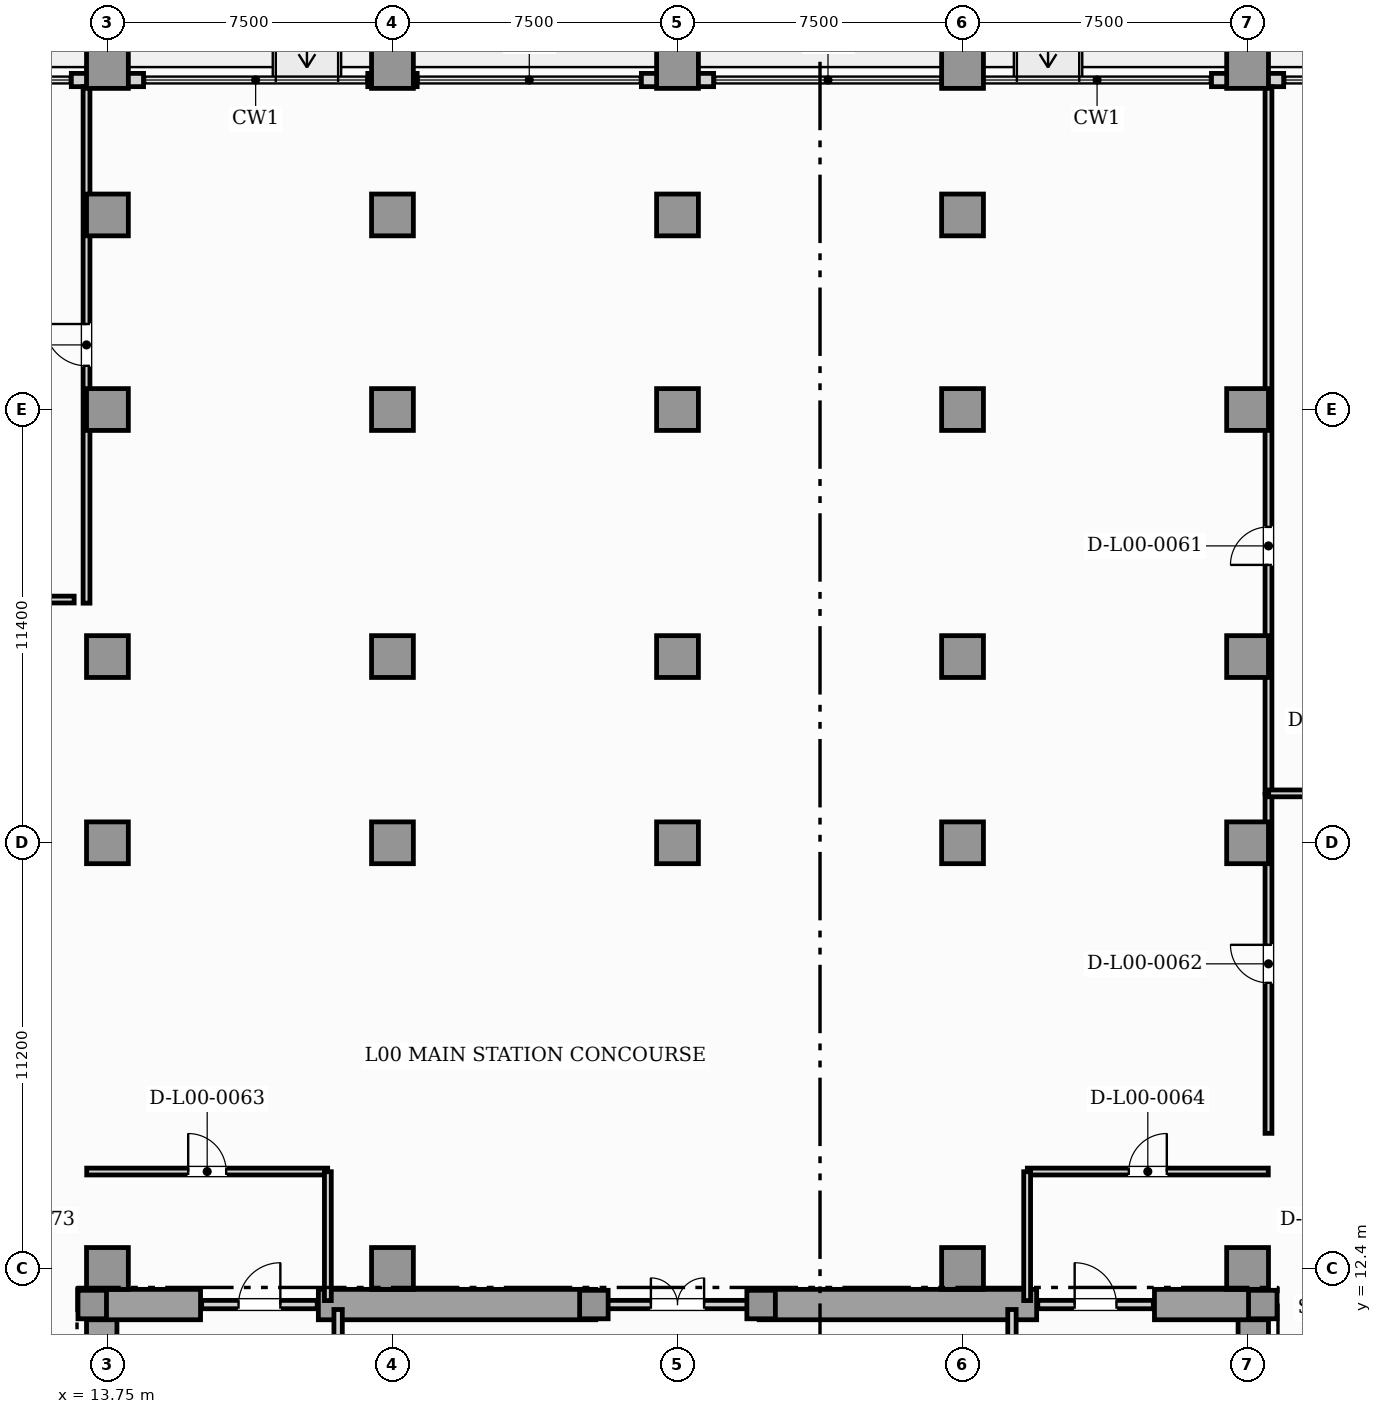
"""IFC4 building model, lengths in metres.
Left out: names, types, materials, properties, quantities, classifications, styles, units other than length and angle.
Written with IfcOpenShell. Run it as: python <this file> out.ifc"""

import sys

from ifc_helpers import new_model, si_unit, direction, frame, frame_2d, origin, origin_2d, place, context, subcontext, project, spatial, rectangle, extrude, element, fill, save


model = new_model("IFC4")
c1 = context("Model", 3, precision=1e-05, world=origin(), true_north=direction((0.0, 1.0)))
c2 = subcontext(c1, "Body", "Model", "MODEL_VIEW")
j1 = project(units=[si_unit("LENGTHUNIT", "METRE"), si_unit("PLANEANGLEUNIT", "RADIAN")], contexts=[c1])
p1 = place(None, origin())
s1 = spatial("IfcSite", under=j1, at=p1, CompositionType="ELEMENT")
p2 = place(p1, origin())
s2 = spatial("IfcBuilding", under=s1, at=p2, CompositionType="ELEMENT")
p3 = place(p2, origin())
s3 = spatial("IfcBuildingStorey", under=s2, at=p3, CompositionType="ELEMENT", Elevation=0.0)
for number, where, z_axis, x_axis in (
    (1, (13.6, 0.92, 0.0), (0.0, 0.0, 1.0), (0.0, 1.0, 0.0)),
    (2, (43.9, 0.92, 0.0), (0.0, 0.0, 1.0), (0.0, 1.0, 0.0)),
):
    element("IfcWall", number, at=place(p3, frame(where, z_axis=z_axis, x_axis=x_axis)), inside=s3, PredefinedType="SHEAR", context=c2, shape_type="SweptSolid", body=[
        extrude(rectangle(XDim=10.53, YDim=0.8, at=frame_2d((5.265, 0.0))), origin(), (0.0, 0.0, 1.0), 5.1),
    ])
p4 = place(p3, frame((13.25, 11.45, 0.0), z_axis=(0.0, 0.0, 1.0), x_axis=(1.0, 0.0, 0.0)))
e3 = element("IfcWall", 3, at=p4, inside=s3, PredefinedType="SHEAR", context=c2, shape_type="SweptSolid", body=[
    extrude(rectangle(XDim=2.95, YDim=0.8, at=frame_2d((1.475, 0.0))), origin(), (0.0, 0.0, 1.0), 5.1),
])
for number, where, z_axis, x_axis in (
    (4, (19.3, 11.45, 0.0), (0.0, 0.0, 1.0), (1.0, 0.0, 0.0)),
    (5, (30.9, 11.45, 0.0), (0.0, 0.0, 1.0), (1.0, 0.0, 0.0)),
):
    element("IfcWall", number, at=place(p3, frame(where, z_axis=z_axis, x_axis=x_axis)), inside=s3, PredefinedType="SHEAR", context=c2, shape_type="SweptSolid", body=[
        extrude(rectangle(XDim=7.3, YDim=0.8, at=frame_2d((3.65, 0.0))), origin(), (0.0, 0.0, 1.0), 5.1),
    ])
p5 = place(p3, frame((41.3, 11.45, 0.0), z_axis=(0.0, 0.0, 1.0), x_axis=(1.0, 0.0, 0.0)))
e6 = element("IfcWall", 6, at=p5, inside=s3, PredefinedType="SHEAR", context=c2, shape_type="SweptSolid", body=[
    extrude(rectangle(XDim=2.95, YDim=0.8, at=frame_2d((1.475, 0.0))), origin(), (0.0, 0.0, 1.0), 5.1),
])
for number, where, z_axis, x_axis in (
    (7, (13.35, 11.45, 0.0), (0.0, 0.0, 1.0), (1.0, 0.0, 0.0)),
    (8, (44.15, 11.45, 0.0), (0.0, 0.0, 1.0), (1.0, 0.0, 0.0)),
    (9, (26.55, 11.45, 0.0), (0.0, 0.0, 1.0), (1.0, 0.0, 0.0)),
    (10, (30.95, 11.45, 0.0), (0.0, 0.0, 1.0), (1.0, 0.0, 0.0)),
):
    element("IfcColumn", number, at=place(p3, frame(where, z_axis=z_axis, x_axis=x_axis)), inside=s3, PredefinedType="COLUMN", context=c2, shape_type="SweptSolid", body=[
        extrude(rectangle(XDim=0.75, YDim=0.75, at=origin_2d()), origin(), (0.0, 0.0, 1.0), 5.4),
    ])
for number, where, z_axis, x_axis in (
    (11, (13.75, 12.4, 0.0), (0.0, 0.0, 1.0), (1.0, 0.0, 0.0)),
    (12, (13.75, 23.6, 0.0), (0.0, 0.0, 1.0), (1.0, 0.0, 0.0)),
    (13, (13.75, 35.0, 0.0), (0.0, 0.0, 1.0), (1.0, 0.0, 0.0)),
    (14, (13.75, 44.0, 0.0), (0.0, 0.0, 1.0), (1.0, 0.0, 0.0)),
    (15, (28.75, 23.6, 0.0), (0.0, 0.0, 1.0), (1.0, 0.0, 0.0)),
    (16, (28.75, 35.0, 0.0), (0.0, 0.0, 1.0), (1.0, 0.0, 0.0)),
    (17, (28.75, 44.0, 0.0), (0.0, 0.0, 1.0), (1.0, 0.0, 0.0)),
    (18, (43.75, 12.4, 0.0), (0.0, 0.0, 1.0), (1.0, 0.0, 0.0)),
    (19, (43.75, 23.6, 0.0), (0.0, 0.0, 1.0), (1.0, 0.0, 0.0)),
    (20, (43.75, 35.0, 0.0), (0.0, 0.0, 1.0), (1.0, 0.0, 0.0)),
    (21, (43.75, 44.0, 0.0), (0.0, 0.0, 1.0), (1.0, 0.0, 0.0)),
    (22, (21.25, 12.4, 0.0), (0.0, 0.0, 1.0), (1.0, 0.0, 0.0)),
    (23, (36.25, 12.4, 0.0), (0.0, 0.0, 1.0), (1.0, 0.0, 0.0)),
    (24, (21.25, 23.6, 0.0), (0.0, 0.0, 1.0), (1.0, 0.0, 0.0)),
    (25, (36.25, 23.6, 0.0), (0.0, 0.0, 1.0), (1.0, 0.0, 0.0)),
    (26, (13.75, 28.5, 0.0), (0.0, 0.0, 1.0), (1.0, 0.0, 0.0)),
    (27, (21.25, 28.5, 0.0), (0.0, 0.0, 1.0), (1.0, 0.0, 0.0)),
    (28, (28.75, 28.5, 0.0), (0.0, 0.0, 1.0), (1.0, 0.0, 0.0)),
    (29, (36.25, 28.5, 0.0), (0.0, 0.0, 1.0), (1.0, 0.0, 0.0)),
    (30, (43.75, 28.5, 0.0), (0.0, 0.0, 1.0), (1.0, 0.0, 0.0)),
    (31, (21.25, 35.0, 0.0), (0.0, 0.0, 1.0), (1.0, 0.0, 0.0)),
    (32, (36.25, 35.0, 0.0), (0.0, 0.0, 1.0), (1.0, 0.0, 0.0)),
    (33, (13.75, 40.12, 0.0), (0.0, 0.0, 1.0), (1.0, 0.0, 0.0)),
    (34, (21.25, 40.12, 0.0), (0.0, 0.0, 1.0), (1.0, 0.0, 0.0)),
    (35, (28.75, 40.12, 0.0), (0.0, 0.0, 1.0), (1.0, 0.0, 0.0)),
    (36, (36.25, 40.12, 0.0), (0.0, 0.0, 1.0), (1.0, 0.0, 0.0)),
    (37, (21.25, 44.0, 0.0), (0.0, 0.0, 1.0), (1.0, 0.0, 0.0)),
    (38, (36.25, 44.0, 0.0), (0.0, 0.0, 1.0), (1.0, 0.0, 0.0)),
):
    element("IfcColumn", number, at=place(p3, frame(where, z_axis=z_axis, x_axis=x_axis)), inside=s3, PredefinedType="COLUMN", context=c2, shape_type="SweptSolid", body=[
        extrude(rectangle(XDim=1.1, YDim=1.1, at=origin_2d()), origin(), (0.0, 0.0, 1.0), 5.4),
    ])
p6 = place(p3, frame((12.8, 43.67, 0.0), z_axis=(0.0, 0.0, 1.0), x_axis=(1.0, 0.0, 0.0)))
e39 = element("IfcWall", 39, at=p6, inside=s3, PredefinedType="SOLIDWALL", context=c2, shape_type="SweptSolid", body=[
    extrude(rectangle(XDim=1.9, YDim=0.35, at=frame_2d((0.95, 0.0))), origin(), (0.0, 0.0, 1.0), 4.483),
])
p7 = place(p3, frame((20.6, 43.67, 0.0), z_axis=(0.0, 0.0, 1.0), x_axis=(1.0, 0.0, 0.0)))
e40 = element("IfcWall", 40, at=p7, inside=s3, PredefinedType="SOLIDWALL", context=c2, shape_type="SweptSolid", body=[
    extrude(rectangle(XDim=1.3, YDim=0.35, at=frame_2d((0.65, 0.0))), origin(), (0.0, 0.0, 1.0), 5.1),
])
for number, where, z_axis, x_axis in (
    (41, (27.8, 43.67, 0.0), (0.0, 0.0, 1.0), (1.0, 0.0, 0.0)),
    (42, (42.8, 43.67, 0.0), (0.0, 0.0, 1.0), (1.0, 0.0, 0.0)),
):
    element("IfcWall", number, at=place(p3, frame(where, z_axis=z_axis, x_axis=x_axis)), inside=s3, PredefinedType="SOLIDWALL", context=c2, shape_type="SweptSolid", body=[
        extrude(rectangle(XDim=1.9, YDim=0.35, at=frame_2d((0.95, 0.0))), origin(), (0.0, 0.0, 1.0), 4.483),
    ])
p8 = place(p3, frame((19.82, 8.52, 0.0), z_axis=(0.0, 0.0, 1.0), x_axis=(0.0, 1.0, 0.0)))
e43 = element("IfcWall", 43, at=p8, inside=s3, PredefinedType="SOLIDWALL", context=c2, shape_type="SweptSolid", body=[
    extrude(rectangle(XDim=2.8, YDim=0.22, at=frame_2d((1.4, 0.0))), origin(), (0.0, 0.0, 1.0), 4.555),
])
p9 = place(p8, frame((0.85, 0.0, 0.0)))
e44 = element("IfcOpeningElement", 44, at=p9, cuts=e43, PredefinedType="OPENING", context=c2, shape_type="SweptSolid", body=[
    extrude(rectangle(XDim=1.1, YDim=2.2, at=frame_2d((0.55, 1.1))), frame((0.0, 0.12, 0.0), z_axis=(0.0, -1.0, 0.0), x_axis=(1.0, 0.0, 0.0)), (0.0, 0.0, 1.0), 0.24),
])
p10 = place(p3, frame((37.55, 8.52, 0.0), z_axis=(0.0, 0.0, 1.0), x_axis=(0.0, 1.0, 0.0)))
e45 = element("IfcWall", 45, at=p10, inside=s3, PredefinedType="SOLIDWALL", context=c2, shape_type="SweptSolid", body=[
    extrude(rectangle(XDim=2.8, YDim=0.22, at=frame_2d((1.4, 0.0))), origin(), (0.0, 0.0, 1.0), 4.555),
])
p11 = place(p10, frame((0.85, 0.0, 0.0)))
e46 = element("IfcOpeningElement", 46, at=p11, cuts=e45, PredefinedType="OPENING", context=c2, shape_type="SweptSolid", body=[
    extrude(rectangle(XDim=1.1, YDim=2.2, at=frame_2d((0.55, 1.1))), frame((0.0, 0.12, 0.0), z_axis=(0.0, -1.0, 0.0), x_axis=(1.0, 0.0, 0.0)), (0.0, 0.0, 1.0), 0.24),
])
p12 = place(p3, frame((16.23, 11.45, 0.0), z_axis=(0.0, 0.0, 1.0), x_axis=(1.0, 0.0, 0.0)))
e47 = element("IfcWall", 47, at=p12, inside=s3, PredefinedType="SOLIDWALL", context=c2, shape_type="SweptSolid", body=[
    extrude(rectangle(XDim=3.04, YDim=0.22, at=frame_2d((1.52, 0.0))), origin(), (0.0, 0.0, 1.0), 5.1),
])
p13 = place(p12, frame((0.97, 0.0, 0.0)))
e48 = element("IfcOpeningElement", 48, at=p13, cuts=e47, PredefinedType="OPENING", context=c2, shape_type="SweptSolid", body=[
    extrude(rectangle(XDim=1.1, YDim=2.2, at=frame_2d((0.55, 1.1))), frame((0.0, 0.12, 0.0), z_axis=(0.0, -1.0, 0.0), x_axis=(1.0, 0.0, 0.0)), (0.0, 0.0, 1.0), 0.24),
])
p14 = place(p3, frame((26.63, 11.45, 0.0), z_axis=(0.0, 0.0, 1.0), x_axis=(1.0, 0.0, 0.0)))
e49 = element("IfcWall", 49, at=p14, inside=s3, PredefinedType="SOLIDWALL", context=c2, shape_type="SweptSolid", body=[
    extrude(rectangle(XDim=4.24, YDim=0.22, at=frame_2d((2.12, 0.0))), origin(), (0.0, 0.0, 1.0), 5.1),
])
p15 = place(p14, frame((1.42, 0.0, 0.0)))
e50 = element("IfcOpeningElement", 50, at=p15, cuts=e49, PredefinedType="OPENING", context=c2, shape_type="SweptSolid", body=[
    extrude(rectangle(XDim=1.4, YDim=2.2, at=frame_2d((0.7, 1.1))), frame((0.0, 0.12, 0.0), z_axis=(0.0, -1.0, 0.0), x_axis=(1.0, 0.0, 0.0)), (0.0, 0.0, 1.0), 0.24),
])
p16 = place(p3, frame((38.23, 11.45, 0.0), z_axis=(0.0, 0.0, 1.0), x_axis=(1.0, 0.0, 0.0)))
e51 = element("IfcWall", 51, at=p16, inside=s3, PredefinedType="SOLIDWALL", context=c2, shape_type="SweptSolid", body=[
    extrude(rectangle(XDim=3.04, YDim=0.22, at=frame_2d((1.52, 0.0))), origin(), (0.0, 0.0, 1.0), 5.1),
])
p17 = place(p16, frame((0.97, 0.0, 0.0)))
e52 = element("IfcOpeningElement", 52, at=p17, cuts=e51, PredefinedType="OPENING", context=c2, shape_type="SweptSolid", body=[
    extrude(rectangle(XDim=1.1, YDim=2.2, at=frame_2d((0.55, 1.1))), frame((0.0, 0.12, 0.0), z_axis=(0.0, -1.0, 0.0), x_axis=(1.0, 0.0, 0.0)), (0.0, 0.0, 1.0), 0.24),
])
p18 = place(p3, frame((13.2, 29.905, 0.0), z_axis=(0.0, 0.0, 1.0), x_axis=(0.0, 1.0, 0.0)))
e53 = element("IfcWall", 53, at=p18, inside=s3, PredefinedType="PARTITIONING", context=c2, shape_type="SweptSolid", body=[
    extrude(rectangle(XDim=13.59, YDim=0.18, at=frame_2d((6.795, 0.0))), origin(), (0.0, 0.0, 1.0), 5.1),
])
p19 = place(p18, frame((6.245, 0.0, 0.0)))
e54 = element("IfcOpeningElement", 54, at=p19, cuts=e53, PredefinedType="OPENING", context=c2, shape_type="SweptSolid", body=[
    extrude(rectangle(XDim=1.1, YDim=2.2, at=frame_2d((0.55, 1.1))), frame((0.0, 0.1, 0.0), z_axis=(0.0, -1.0, 0.0), x_axis=(1.0, 0.0, 0.0)), (0.0, 0.0, 1.0), 0.2),
])
p20 = place(p3, frame((44.3, 24.905, 0.0), z_axis=(0.0, 0.0, 1.0), x_axis=(0.0, 1.0, 0.0)))
e55 = element("IfcWall", 55, at=p20, inside=s3, PredefinedType="PARTITIONING", context=c2, shape_type="SweptSolid", body=[
    extrude(rectangle(XDim=18.59, YDim=0.18, at=frame_2d((9.295, 0.0))), origin(), (0.0, 0.0, 1.0), 5.1),
])
p21 = place(p20, frame((6.007, 0.0, 0.0)))
e56 = element("IfcOpeningElement", 56, at=p21, cuts=e55, PredefinedType="OPENING", context=c2, shape_type="SweptSolid", body=[
    extrude(rectangle(XDim=1.0, YDim=2.15, at=frame_2d((0.5, 1.075))), frame((0.0, 0.1, 0.0), z_axis=(0.0, -1.0, 0.0), x_axis=(1.0, 0.0, 0.0)), (0.0, 0.0, 1.0), 0.2),
])
p22 = place(p3, frame((44.3, 15.955, 0.0), z_axis=(0.0, 0.0, 1.0), x_axis=(0.0, 1.0, 0.0)))
e57 = element("IfcWall", 57, at=p22, inside=s3, PredefinedType="PARTITIONING", context=c2, shape_type="SweptSolid", body=[
    extrude(rectangle(XDim=8.92, YDim=0.18, at=frame_2d((4.46, 0.0))), origin(), (0.0, 0.0, 1.0), 5.1),
])
p23 = place(p22, frame((3.96, 0.0, 0.0)))
e58 = element("IfcOpeningElement", 58, at=p23, cuts=e57, PredefinedType="OPENING", context=c2, shape_type="SweptSolid", body=[
    extrude(rectangle(XDim=1.0, YDim=2.15, at=frame_2d((0.5, 1.075))), frame((0.0, 0.1, 0.0), z_axis=(0.0, -1.0, 0.0), x_axis=(1.0, 0.0, 0.0)), (0.0, 0.0, 1.0), 0.2),
])
p24 = place(p3, frame((13.205, 14.95, 0.0), z_axis=(0.0, 0.0, 1.0), x_axis=(1.0, 0.0, 0.0)))
e59 = element("IfcWall", 59, at=p24, inside=s3, PredefinedType="PARTITIONING", context=c2, shape_type="SweptSolid", body=[
    extrude(rectangle(XDim=6.34, YDim=0.18, at=frame_2d((3.17, 0.0))), origin(), (0.0, 0.0, 1.0), 5.1),
])
p25 = place(p24, frame((2.67, 0.0, 0.0)))
e60 = element("IfcOpeningElement", 60, at=p25, cuts=e59, PredefinedType="OPENING", context=c2, shape_type="SweptSolid", body=[
    extrude(rectangle(XDim=1.0, YDim=2.15, at=frame_2d((0.5, 1.075))), frame((0.0, 0.1, 0.0), z_axis=(0.0, -1.0, 0.0), x_axis=(1.0, 0.0, 0.0)), (0.0, 0.0, 1.0), 0.2),
])
p26 = place(p3, frame((19.55, 11.555, 0.0), z_axis=(0.0, 0.0, 1.0), x_axis=(0.0, 1.0, 0.0)))
e61 = element("IfcWall", 61, at=p26, inside=s3, PredefinedType="PARTITIONING", context=c2, shape_type="SweptSolid", body=[
    extrude(rectangle(XDim=3.39, YDim=0.18, at=frame_2d((1.695, 0.0))), origin(), (0.0, 0.0, 1.0), 5.1),
])
p27 = place(p3, frame((37.955, 14.95, 0.0), z_axis=(0.0, 0.0, 1.0), x_axis=(1.0, 0.0, 0.0)))
e62 = element("IfcWall", 62, at=p27, inside=s3, PredefinedType="PARTITIONING", context=c2, shape_type="SweptSolid", body=[
    extrude(rectangle(XDim=6.34, YDim=0.18, at=frame_2d((3.17, 0.0))), origin(), (0.0, 0.0, 1.0), 5.1),
])
p28 = place(p27, frame((2.67, 0.0, 0.0)))
e63 = element("IfcOpeningElement", 63, at=p28, cuts=e62, PredefinedType="OPENING", context=c2, shape_type="SweptSolid", body=[
    extrude(rectangle(XDim=1.0, YDim=2.15, at=frame_2d((0.5, 1.075))), frame((0.0, 0.1, 0.0), z_axis=(0.0, -1.0, 0.0), x_axis=(1.0, 0.0, 0.0)), (0.0, 0.0, 1.0), 0.2),
])
p29 = place(p3, frame((37.95, 11.555, 0.0), z_axis=(0.0, 0.0, 1.0), x_axis=(0.0, 1.0, 0.0)))
e64 = element("IfcWall", 64, at=p29, inside=s3, PredefinedType="PARTITIONING", context=c2, shape_type="SweptSolid", body=[
    extrude(rectangle(XDim=3.39, YDim=0.18, at=frame_2d((1.695, 0.0))), origin(), (0.0, 0.0, 1.0), 5.1),
])
p30 = place(p3, frame((44.305, 24.9, 0.0), z_axis=(0.0, 0.0, 1.0), x_axis=(1.0, 0.0, 0.0)))
e65 = element("IfcWall", 65, at=p30, inside=s3, PredefinedType="PARTITIONING", context=c2, shape_type="SweptSolid", body=[
    extrude(rectangle(XDim=3.09, YDim=0.18, at=frame_2d((1.545, 0.0))), origin(), (0.0, 0.0, 1.0), 5.1),
])
p31 = place(p30, frame((1.045, 0.0, 0.0)))
e66 = element("IfcOpeningElement", 66, at=p31, cuts=e65, PredefinedType="OPENING", context=c2, shape_type="SweptSolid", body=[
    extrude(rectangle(XDim=1.0, YDim=2.15, at=frame_2d((0.5, 1.075))), frame((0.0, 0.1, 0.0), z_axis=(0.0, -1.0, 0.0), x_axis=(1.0, 0.0, 0.0)), (0.0, 0.0, 1.0), 0.2),
])
p32 = place(p3, frame((-0.705, 30.0, 0.0), z_axis=(0.0, 0.0, 1.0), x_axis=(1.0, 0.0, 0.0)))
e67 = element("IfcWall", 67, at=p32, inside=s3, PredefinedType="PARTITIONING", context=c2, shape_type="SweptSolid", body=[
    extrude(rectangle(XDim=13.58, YDim=0.18, at=frame_2d((6.79, 0.0))), origin(), (0.0, 0.0, 1.0), 5.1),
])
p33 = place(p13, origin())
e68 = element("IfcDoor", 68, at=p33, inside=s3, OperationType="SINGLE_SWING_RIGHT", PredefinedType="DOOR", context=c2, shape_type="SweptSolid", body=[
    extrude(rectangle(XDim=1.1, YDim=2.2, at=frame_2d((0.55, 1.1))), frame((0.0, 0.025, 0.0), z_axis=(0.0, -1.0, 0.0), x_axis=(1.0, 0.0, 0.0)), (0.0, 0.0, 1.0), 0.05),
])
fill(e48, e68)
p34 = place(p15, origin())
e69 = element("IfcDoor", 69, at=p34, inside=s3, OperationType="DOUBLE_DOOR_SINGLE_SWING", PredefinedType="DOOR", context=c2, shape_type="SweptSolid", body=[
    extrude(rectangle(XDim=1.4, YDim=2.2, at=frame_2d((0.7, 1.1))), frame((0.0, 0.025, 0.0), z_axis=(0.0, -1.0, 0.0), x_axis=(1.0, 0.0, 0.0)), (0.0, 0.0, 1.0), 0.05),
])
fill(e50, e69)
p35 = place(p17, origin())
e70 = element("IfcDoor", 70, at=p35, inside=s3, OperationType="SINGLE_SWING_LEFT", PredefinedType="DOOR", context=c2, shape_type="SweptSolid", body=[
    extrude(rectangle(XDim=1.1, YDim=2.2, at=frame_2d((0.55, 1.1))), frame((0.0, 0.025, 0.0), z_axis=(0.0, -1.0, 0.0), x_axis=(1.0, 0.0, 0.0)), (0.0, 0.0, 1.0), 0.05),
])
fill(e52, e70)
p36 = place(p19, origin())
e71 = element("IfcDoor", 71, at=p36, inside=s3, OperationType="SINGLE_SWING_RIGHT", PredefinedType="DOOR", context=c2, shape_type="SweptSolid", body=[
    extrude(rectangle(XDim=1.1, YDim=2.2, at=frame_2d((0.55, 1.1))), frame((0.0, 0.025, 0.0), z_axis=(0.0, -1.0, 0.0), x_axis=(1.0, 0.0, 0.0)), (0.0, 0.0, 1.0), 0.05),
])
fill(e54, e71)
p37 = place(p21, origin())
e72 = element("IfcDoor", 72, at=p37, inside=s3, OperationType="SINGLE_SWING_LEFT", PredefinedType="DOOR", context=c2, shape_type="SweptSolid", body=[
    extrude(rectangle(XDim=1.0, YDim=2.15, at=frame_2d((0.5, 1.075))), frame((0.0, 0.025, 0.0), z_axis=(0.0, -1.0, 0.0), x_axis=(1.0, 0.0, 0.0)), (0.0, 0.0, 1.0), 0.05),
])
fill(e56, e72)
p38 = place(p23, origin())
e73 = element("IfcDoor", 73, at=p38, inside=s3, OperationType="SINGLE_SWING_RIGHT", PredefinedType="DOOR", context=c2, shape_type="SweptSolid", body=[
    extrude(rectangle(XDim=1.0, YDim=2.15, at=frame_2d((0.5, 1.075))), frame((0.0, 0.025, 0.0), z_axis=(0.0, -1.0, 0.0), x_axis=(1.0, 0.0, 0.0)), (0.0, 0.0, 1.0), 0.05),
])
fill(e58, e73)
p39 = place(p25, origin())
e74 = element("IfcDoor", 74, at=p39, inside=s3, OperationType="SINGLE_SWING_LEFT", PredefinedType="DOOR", context=c2, shape_type="SweptSolid", body=[
    extrude(rectangle(XDim=1.0, YDim=2.15, at=frame_2d((0.5, 1.075))), frame((0.0, 0.025, 0.0), z_axis=(0.0, -1.0, 0.0), x_axis=(1.0, 0.0, 0.0)), (0.0, 0.0, 1.0), 0.05),
])
fill(e60, e74)
p40 = place(p28, origin())
e75 = element("IfcDoor", 75, at=p40, inside=s3, OperationType="SINGLE_SWING_RIGHT", PredefinedType="DOOR", context=c2, shape_type="SweptSolid", body=[
    extrude(rectangle(XDim=1.0, YDim=2.15, at=frame_2d((0.5, 1.075))), frame((0.0, 0.025, 0.0), z_axis=(0.0, -1.0, 0.0), x_axis=(1.0, 0.0, 0.0)), (0.0, 0.0, 1.0), 0.05),
])
fill(e63, e75)
save(model, sys.argv[1])
